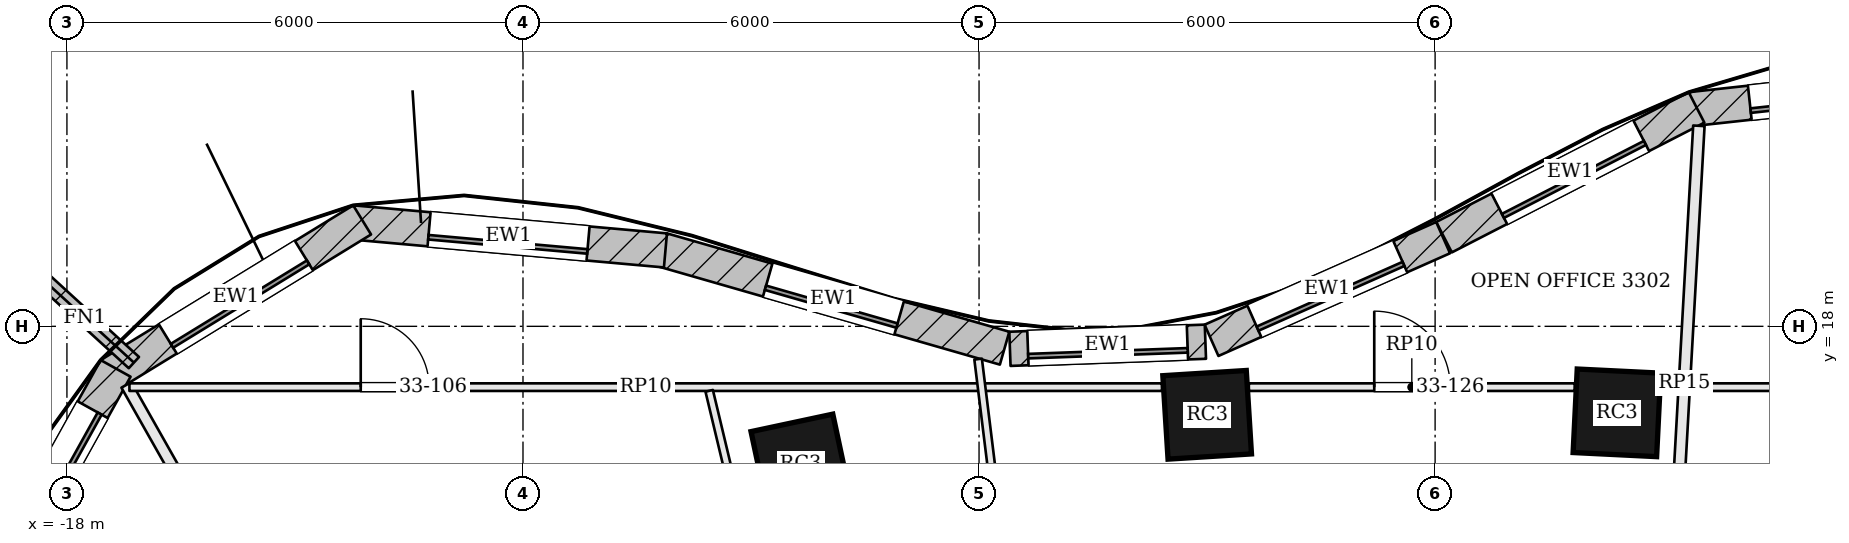
"""IFC4 building model, lengths in metres.
Left out: names, types, materials, properties, quantities, classifications, styles, units other than length and angle.
Written with IfcOpenShell. Run it as: python <this file> out.ifc"""

import sys

from ifc_helpers import new_model, si_unit, direction, frame, frame_2d, origin, origin_2d, place, context, subcontext, project, spatial, rectangle, extrude, element, fill, save


model = new_model("IFC4")
c1 = context("Model", 3, precision=1e-05, world=origin(), true_north=direction((0.0, 1.0)))
c2 = subcontext(c1, "Body", "Model", "MODEL_VIEW")
j1 = project(units=[si_unit("LENGTHUNIT", "METRE"), si_unit("PLANEANGLEUNIT", "RADIAN")], contexts=[c1])
p1 = place(None, origin())
s1 = spatial("IfcSite", under=j1, at=p1, CompositionType="ELEMENT")
p2 = place(p1, origin())
s2 = spatial("IfcBuilding", under=s1, at=p2, CompositionType="ELEMENT")
p3 = place(p2, frame((0.0, 0.0, 138.3)))
s3 = spatial("IfcBuildingStorey", under=s2, at=p3, CompositionType="ELEMENT", Elevation=138.3)
for number, where, z_axis, x_axis in (
    (1, (2.392, 16.862, 0.0), (0.0, 0.0, 1.0), (-0.999, 0.049, 0.0)),
    (2, (-2.999, 16.836, 0.0), (0.0, 0.0, 1.0), (-0.998, -0.062, 0.0)),
    (3, (-8.347, 16.192, 0.0), (0.0, 0.0, 1.0), (-0.978, -0.209, 0.0)),
):
    element("IfcColumn", number, at=place(p3, frame(where, z_axis=z_axis, x_axis=x_axis)), inside=s3, PredefinedType="COLUMN", context=c2, shape_type="SweptSolid", body=[
        extrude(rectangle(XDim=1.1, YDim=1.1, at=origin_2d()), origin(), (0.0, 0.0, 1.0), 3.9),
    ])
p4 = place(p3, frame((7.003, 21.255, 0.0), z_axis=(0.0, 0.0, 1.0), x_axis=(-0.99407653264, -0.108682322638, 0.0)))
e4 = element("IfcWall", 4, at=p4, inside=s3, PredefinedType="SOLIDWALL", context=c2, shape_type="SweptSolid", body=[
    extrude(rectangle(XDim=3.662, YDim=0.45, at=frame_2d((1.831, 0.0))), origin(), (0.0, 0.0, 1.0), 3.7),
])
p5 = place(p4, frame((0.781, 0.0, 0.9)))
e5 = element("IfcOpeningElement", 5, at=p5, cuts=e4, PredefinedType="OPENING", context=c2, shape_type="SweptSolid", body=[
    extrude(rectangle(XDim=2.1, YDim=2.3, at=frame_2d((1.05, 1.15))), frame((0.0, 0.235, 0.0), z_axis=(0.0, -1.0, 0.0), x_axis=(1.0, 0.0, 0.0)), (0.0, 0.0, 1.0), 0.47),
])
p6 = place(p3, frame((3.44, 20.88, 0.0), z_axis=(0.0, 0.0, 1.0), x_axis=(-0.889471529144, -0.456990589446, 0.0)))
e6 = element("IfcWall", 6, at=p6, inside=s3, PredefinedType="SOLIDWALL", context=c2, shape_type="SweptSolid", body=[
    extrude(rectangle(XDim=3.735, YDim=0.45, at=frame_2d((1.868, 0.0))), origin(), (0.0, 0.0, 1.0), 3.7),
])
p7 = place(p6, frame((0.818, 0.0, 0.9)))
e7 = element("IfcOpeningElement", 7, at=p7, cuts=e6, PredefinedType="OPENING", context=c2, shape_type="SweptSolid", body=[
    extrude(rectangle(XDim=2.1, YDim=2.3, at=frame_2d((1.05, 1.15))), frame((0.0, 0.235, 0.0), z_axis=(0.0, -1.0, 0.0), x_axis=(1.0, 0.0, 0.0)), (0.0, 0.0, 1.0), 0.47),
])
p8 = place(p3, frame((0.105, 19.167, 0.0), z_axis=(0.0, 0.0, 1.0), x_axis=(-0.91414046241, -0.405397601109, 0.0)))
e8 = element("IfcWall", 8, at=p8, inside=s3, PredefinedType="SOLIDWALL", context=c2, shape_type="SweptSolid", body=[
    extrude(rectangle(XDim=3.333, YDim=0.45, at=frame_2d((1.667, 0.0))), origin(), (0.0, 0.0, 1.0), 3.7),
])
p9 = place(p8, frame((0.617, 0.0, 0.9)))
e9 = element("IfcOpeningElement", 9, at=p9, cuts=e8, PredefinedType="OPENING", context=c2, shape_type="SweptSolid", body=[
    extrude(rectangle(XDim=2.1, YDim=2.3, at=frame_2d((1.05, 1.15))), frame((0.0, 0.235, 0.0), z_axis=(0.0, -1.0, 0.0), x_axis=(1.0, 0.0, 0.0)), (0.0, 0.0, 1.0), 0.47),
])
p10 = place(p3, frame((-3.022, 17.798, 0.0), z_axis=(0.0, 0.0, 1.0), x_axis=(-0.999339560591, -0.036337895349, 0.0)))
e10 = element("IfcWall", 10, at=p10, inside=s3, PredefinedType="SOLIDWALL", context=c2, shape_type="SweptSolid", body=[
    extrude(rectangle(XDim=2.573, YDim=0.45, at=frame_2d((1.287, 0.0))), origin(), (0.0, 0.0, 1.0), 3.7),
])
p11 = place(p10, frame((0.237, 0.0, 0.9)))
e11 = element("IfcOpeningElement", 11, at=p11, cuts=e10, PredefinedType="OPENING", context=c2, shape_type="SweptSolid", body=[
    extrude(rectangle(XDim=2.1, YDim=2.3, at=frame_2d((1.05, 1.15))), frame((0.0, 0.235, 0.0), z_axis=(0.0, -1.0, 0.0), x_axis=(1.0, 0.0, 0.0)), (0.0, 0.0, 1.0), 0.47),
])
p12 = place(p3, frame((-5.664, 17.713, 0.0), z_axis=(0.0, 0.0, 1.0), x_axis=(-0.961108031684, 0.276172684083, 0.0)))
e12 = element("IfcWall", 12, at=p12, inside=s3, PredefinedType="SOLIDWALL", context=c2, shape_type="SweptSolid", body=[
    extrude(rectangle(XDim=4.686, YDim=0.45, at=frame_2d((2.343, 0.0))), origin(), (0.0, 0.0, 1.0), 3.7),
])
p13 = place(p12, frame((1.443, 0.0, 0.9)))
e13 = element("IfcOpeningElement", 13, at=p13, cuts=e12, PredefinedType="OPENING", context=c2, shape_type="SweptSolid", body=[
    extrude(rectangle(XDim=1.8, YDim=2.3, at=frame_2d((0.9, 1.15))), frame((0.0, 0.235, 0.0), z_axis=(0.0, -1.0, 0.0), x_axis=(1.0, 0.0, 0.0)), (0.0, 0.0, 1.0), 0.47),
])
p14 = place(p3, frame((-10.126, 18.999, 0.0), z_axis=(0.0, 0.0, 1.0), x_axis=(-0.996031087117, 0.089006030672, 0.0)))
e14 = element("IfcWall", 14, at=p14, inside=s3, PredefinedType="SOLIDWALL", context=c2, shape_type="SweptSolid", body=[
    extrude(rectangle(XDim=4.145, YDim=0.45, at=frame_2d((2.072, 0.0))), origin(), (0.0, 0.0, 1.0), 3.7),
])
p15 = place(p14, frame((1.022, 0.0, 0.9)))
e15 = element("IfcOpeningElement", 15, at=p15, cuts=e14, PredefinedType="OPENING", context=c2, shape_type="SweptSolid", body=[
    extrude(rectangle(XDim=2.1, YDim=2.3, at=frame_2d((1.05, 1.15))), frame((0.0, 0.235, 0.0), z_axis=(0.0, -1.0, 0.0), x_axis=(1.0, 0.0, 0.0)), (0.0, 0.0, 1.0), 0.47),
])
p16 = place(p3, frame((-14.116, 19.4, 0.0), z_axis=(0.0, 0.0, 1.0), x_axis=(-0.852622865325, -0.522526793117, 0.0)))
e16 = element("IfcWall", 16, at=p16, inside=s3, PredefinedType="SOLIDWALL", context=c2, shape_type="SweptSolid", body=[
    extrude(rectangle(XDim=3.896, YDim=0.45, at=frame_2d((1.948, 0.0))), origin(), (0.0, 0.0, 1.0), 3.7),
])
p17 = place(p16, frame((0.898, 0.0, 0.9)))
e17 = element("IfcOpeningElement", 17, at=p17, cuts=e16, PredefinedType="OPENING", context=c2, shape_type="SweptSolid", body=[
    extrude(rectangle(XDim=2.1, YDim=2.3, at=frame_2d((1.05, 1.15))), frame((0.0, 0.235, 0.0), z_axis=(0.0, -1.0, 0.0), x_axis=(1.0, 0.0, 0.0)), (0.0, 0.0, 1.0), 0.47),
])
p18 = place(p3, frame((-17.359, 17.447, 0.0), z_axis=(0.0, 0.0, 1.0), x_axis=(-0.485618126214, -0.874171056197, 0.0)))
e18 = element("IfcWall", 18, at=p18, inside=s3, PredefinedType="SOLIDWALL", context=c2, shape_type="SweptSolid", body=[
    extrude(rectangle(XDim=3.343, YDim=0.45, at=frame_2d((1.671, 0.0))), origin(), (0.0, 0.0, 1.0), 3.7),
])
p19 = place(p18, frame((0.621, 0.0, 0.9)))
e19 = element("IfcOpeningElement", 19, at=p19, cuts=e18, PredefinedType="OPENING", context=c2, shape_type="SweptSolid", body=[
    extrude(rectangle(XDim=2.1, YDim=2.3, at=frame_2d((1.05, 1.15))), frame((0.0, 0.235, 0.0), z_axis=(0.0, -1.0, 0.0), x_axis=(1.0, 0.0, 0.0)), (0.0, 0.0, 1.0), 0.47),
])
p20 = place(p3, frame((-17.119, 17.523, 0.0), z_axis=(0.0, 0.0, 1.0), x_axis=(-0.737866019047, 0.674947211221, 0.0)))
e20 = element("IfcWall", 20, at=p20, inside=s3, PredefinedType="SOLIDWALL", context=c2, shape_type="SweptSolid", body=[
    extrude(rectangle(XDim=1.75, YDim=0.2, at=frame_2d((0.875, 0.0))), origin(), (0.0, 0.0, 1.0), 3.7),
])
p21 = place(p3, frame((3.47, 20.638, 0.0), z_axis=(0.0, 0.0, 1.0), x_axis=(-0.056008975247, -0.998430265312, 0.0)))
e21 = element("IfcWall", 21, at=p21, inside=s3, PredefinedType="PARTITIONING", context=c2, shape_type="SweptSolid", body=[
    extrude(rectangle(XDim=6.774, YDim=0.15, at=frame_2d((3.387, 0.0))), origin(), (0.0, 0.0, 1.0), 3.198),
])
p22 = place(p3, frame((-17.218, 17.23, 0.0), z_axis=(0.0, 0.0, 1.0), x_axis=(0.492436580725, -0.870348329098, 0.0)))
e22 = element("IfcWall", 22, at=p22, inside=s3, PredefinedType="PARTITIONING", context=c2, shape_type="SweptSolid", body=[
    extrude(rectangle(XDim=4.835, YDim=0.15, at=frame_2d((2.417, 0.0))), origin(), (0.0, 0.0, 1.0), 3.198),
])
p23 = place(p3, frame((3.298, 17.2, 0.0), z_axis=(0.0, 0.0, 1.0), x_axis=(1.0, 0.0, 0.0)))
e23 = element("IfcWall", 23, at=p23, inside=s3, PredefinedType="PARTITIONING", context=c2, shape_type="SweptSolid", body=[
    extrude(rectangle(XDim=8.85, YDim=0.1, at=frame_2d((4.425, 0.0))), origin(), (0.0, 0.0, 1.0), 3.184),
])
p24 = place(p3, frame((-17.178, 17.2, 0.0), z_axis=(0.0, 0.0, 1.0), x_axis=(1.0, 0.0, 0.0)))
e24 = element("IfcWall", 24, at=p24, inside=s3, PredefinedType="PARTITIONING", context=c2, shape_type="SweptSolid", body=[
    extrude(rectangle(XDim=13.585, YDim=0.1, at=frame_2d((6.792, 0.0))), origin(), (0.0, 0.0, 1.0), 3.184),
])
p25 = place(p24, frame((3.043, 0.0, 0.0)))
e25 = element("IfcOpeningElement", 25, at=p25, cuts=e24, PredefinedType="OPENING", context=c2, shape_type="SweptSolid", body=[
    extrude(rectangle(XDim=0.9, YDim=2.1, at=frame_2d((0.45, 1.05))), frame((0.0, 0.06, 0.0), z_axis=(0.0, -1.0, 0.0), x_axis=(1.0, 0.0, 0.0)), (0.0, 0.0, 1.0), 0.12),
])
p26 = place(p3, frame((-2.451, 17.2, 0.0), z_axis=(0.0, 0.0, 1.0), x_axis=(1.0, 0.0, 0.0)))
e26 = element("IfcWall", 26, at=p26, inside=s3, PredefinedType="PARTITIONING", context=c2, shape_type="SweptSolid", body=[
    extrude(rectangle(XDim=4.289, YDim=0.1, at=frame_2d((2.144, 0.0))), origin(), (0.0, 0.0, 1.0), 3.184),
])
p27 = place(p26, frame((1.65, 0.0, 0.0)))
e27 = element("IfcOpeningElement", 27, at=p27, cuts=e26, PredefinedType="OPENING", context=c2, shape_type="SweptSolid", body=[
    extrude(rectangle(XDim=1.0, YDim=2.1, at=frame_2d((0.5, 1.05))), frame((0.0, 0.06, 0.0), z_axis=(0.0, -1.0, 0.0), x_axis=(1.0, 0.0, 0.0)), (0.0, 0.0, 1.0), 0.12),
])
p28 = place(p3, frame((-5.556, 13.875, 0.0), z_axis=(0.0, 0.0, 1.0), x_axis=(-0.122573624649, 0.99245942312, 0.0)))
e28 = element("IfcWall", 28, at=p28, inside=s3, PredefinedType="PARTITIONING", context=c2, shape_type="SweptSolid", body=[
    extrude(rectangle(XDim=3.723, YDim=0.1, at=frame_2d((1.861, 0.0))), origin(), (0.0, 0.0, 1.0), 3.184),
])
p29 = place(p3, frame((-8.765, 13.873, 0.0), z_axis=(0.0, 0.0, 1.0), x_axis=(-0.232827854215, 0.972517963999, 0.0)))
e29 = element("IfcWall", 29, at=p29, inside=s3, PredefinedType="PARTITIONING", context=c2, shape_type="SweptSolid", body=[
    extrude(rectangle(XDim=3.371, YDim=0.1, at=frame_2d((1.686, 0.0))), origin(), (0.0, 0.0, 1.0), 3.184),
])
p30 = place(p5, origin())
e30 = element("IfcWindow", 30, at=p30, inside=s3, PartitioningType="SINGLE_PANEL", PredefinedType="WINDOW", context=c2, shape_type="SweptSolid", body=[
    extrude(rectangle(XDim=2.1, YDim=2.3, at=frame_2d((1.05, 1.15))), frame((0.0, 0.135, 0.0), z_axis=(0.0, -1.0, 0.0), x_axis=(1.0, 0.0, 0.0)), (0.0, 0.0, 1.0), 0.06),
])
fill(e5, e30)
p31 = place(p7, origin())
e31 = element("IfcWindow", 31, at=p31, inside=s3, PartitioningType="SINGLE_PANEL", PredefinedType="WINDOW", context=c2, shape_type="SweptSolid", body=[
    extrude(rectangle(XDim=2.1, YDim=2.3, at=frame_2d((1.05, 1.15))), frame((0.0, 0.135, 0.0), z_axis=(0.0, -1.0, 0.0), x_axis=(1.0, 0.0, 0.0)), (0.0, 0.0, 1.0), 0.06),
])
fill(e7, e31)
p32 = place(p9, origin())
e32 = element("IfcWindow", 32, at=p32, inside=s3, PartitioningType="SINGLE_PANEL", PredefinedType="WINDOW", context=c2, shape_type="SweptSolid", body=[
    extrude(rectangle(XDim=2.1, YDim=2.3, at=frame_2d((1.05, 1.15))), frame((0.0, 0.135, 0.0), z_axis=(0.0, -1.0, 0.0), x_axis=(1.0, 0.0, 0.0)), (0.0, 0.0, 1.0), 0.06),
])
fill(e9, e32)
p33 = place(p11, origin())
e33 = element("IfcWindow", 33, at=p33, inside=s3, PartitioningType="SINGLE_PANEL", PredefinedType="WINDOW", context=c2, shape_type="SweptSolid", body=[
    extrude(rectangle(XDim=2.1, YDim=2.3, at=frame_2d((1.05, 1.15))), frame((0.0, 0.135, 0.0), z_axis=(0.0, -1.0, 0.0), x_axis=(1.0, 0.0, 0.0)), (0.0, 0.0, 1.0), 0.06),
])
fill(e11, e33)
p34 = place(p13, origin())
e34 = element("IfcWindow", 34, at=p34, inside=s3, PartitioningType="SINGLE_PANEL", PredefinedType="WINDOW", context=c2, shape_type="SweptSolid", body=[
    extrude(rectangle(XDim=1.8, YDim=2.3, at=frame_2d((0.9, 1.15))), frame((0.0, 0.135, 0.0), z_axis=(0.0, -1.0, 0.0), x_axis=(1.0, 0.0, 0.0)), (0.0, 0.0, 1.0), 0.06),
])
fill(e13, e34)
p35 = place(p15, origin())
e35 = element("IfcWindow", 35, at=p35, inside=s3, PartitioningType="SINGLE_PANEL", PredefinedType="WINDOW", context=c2, shape_type="SweptSolid", body=[
    extrude(rectangle(XDim=2.1, YDim=2.3, at=frame_2d((1.05, 1.15))), frame((0.0, 0.135, 0.0), z_axis=(0.0, -1.0, 0.0), x_axis=(1.0, 0.0, 0.0)), (0.0, 0.0, 1.0), 0.06),
])
fill(e15, e35)
p36 = place(p17, origin())
e36 = element("IfcWindow", 36, at=p36, inside=s3, PartitioningType="SINGLE_PANEL", PredefinedType="WINDOW", context=c2, shape_type="SweptSolid", body=[
    extrude(rectangle(XDim=2.1, YDim=2.3, at=frame_2d((1.05, 1.15))), frame((0.0, 0.135, 0.0), z_axis=(0.0, -1.0, 0.0), x_axis=(1.0, 0.0, 0.0)), (0.0, 0.0, 1.0), 0.06),
])
fill(e17, e36)
p37 = place(p19, origin())
e37 = element("IfcWindow", 37, at=p37, inside=s3, PartitioningType="SINGLE_PANEL", PredefinedType="WINDOW", context=c2, shape_type="SweptSolid", body=[
    extrude(rectangle(XDim=2.1, YDim=2.3, at=frame_2d((1.05, 1.15))), frame((0.0, 0.135, 0.0), z_axis=(0.0, -1.0, 0.0), x_axis=(1.0, 0.0, 0.0)), (0.0, 0.0, 1.0), 0.06),
])
fill(e19, e37)
p38 = place(p25, origin())
e38 = element("IfcDoor", 38, at=p38, inside=s3, OperationType="SINGLE_SWING_LEFT", PredefinedType="DOOR", context=c2, shape_type="SweptSolid", body=[
    extrude(rectangle(XDim=0.9, YDim=2.1, at=frame_2d((0.45, 1.05))), frame((0.0, 0.025, 0.0), z_axis=(0.0, -1.0, 0.0), x_axis=(1.0, 0.0, 0.0)), (0.0, 0.0, 1.0), 0.05),
])
fill(e25, e38)
p39 = place(p27, origin())
e39 = element("IfcDoor", 39, at=p39, inside=s3, OperationType="SINGLE_SWING_LEFT", PredefinedType="DOOR", context=c2, shape_type="SweptSolid", body=[
    extrude(rectangle(XDim=1.0, YDim=2.1, at=frame_2d((0.5, 1.05))), frame((0.0, 0.025, 0.0), z_axis=(0.0, -1.0, 0.0), x_axis=(1.0, 0.0, 0.0)), (0.0, 0.0, 1.0), 0.05),
])
fill(e27, e39)
save(model, sys.argv[1])
